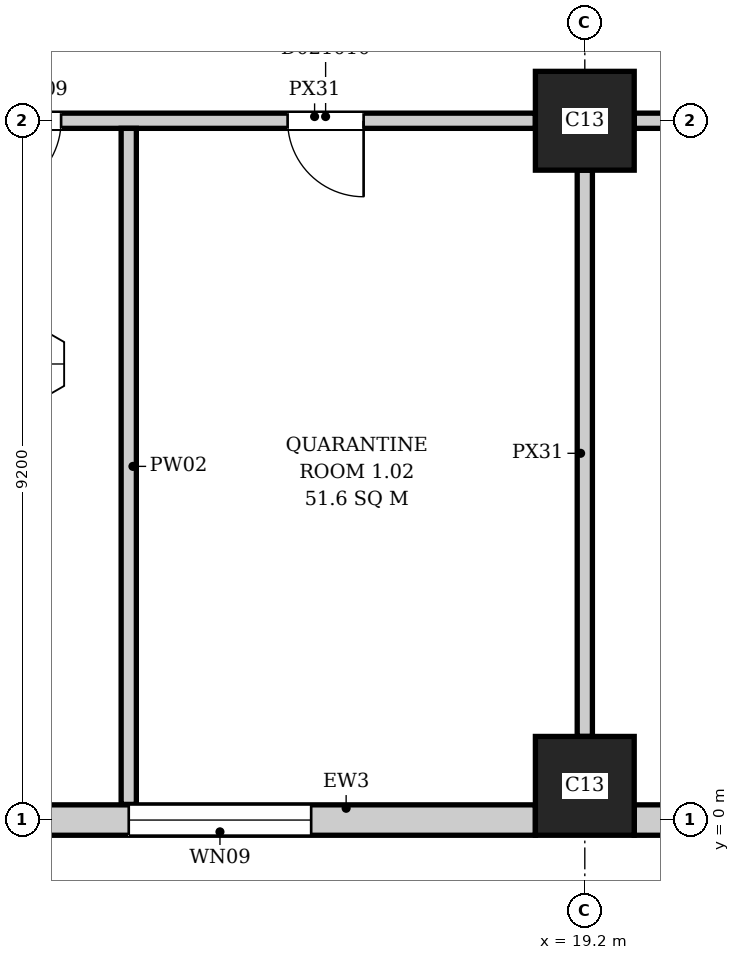
"""IFC4 building model, lengths in metres.
Left out: names, types, materials, properties, quantities, classifications, styles, units other than length and angle.
Written with IfcOpenShell. Run it as: python <this file> out.ifc"""

import sys

from ifc_helpers import new_model, si_unit, direction, frame, frame_2d, origin, origin_2d, place, context, subcontext, project, spatial, rectangle, extrude, element, fill, save


model = new_model("IFC4")
c1 = context("Model", 3, precision=1e-05, world=origin(), true_north=direction((0.0, 1.0)))
c2 = subcontext(c1, "Body", "Model", "MODEL_VIEW")
j1 = project(units=[si_unit("LENGTHUNIT", "METRE"), si_unit("PLANEANGLEUNIT", "RADIAN")], contexts=[c1])
p1 = place(None, origin())
s1 = spatial("IfcSite", under=j1, at=p1, CompositionType="ELEMENT")
p2 = place(p1, origin())
s2 = spatial("IfcBuilding", under=s1, at=p2, CompositionType="ELEMENT")
p3 = place(p2, frame((0.0, 0.0, 6.5)))
s3 = spatial("IfcBuildingStorey", under=s2, at=p3, CompositionType="ELEMENT", Elevation=6.5)
for number, where, z_axis, x_axis in (
    (1, (19.2, 0.45, 0.0), (0.0, 0.0, 1.0), (1.0, 0.0, 0.0)),
    (2, (19.2, 9.2, 0.0), (0.0, 0.0, 1.0), (1.0, 0.0, 0.0)),
):
    element("IfcColumn", number, at=place(p3, frame(where, z_axis=z_axis, x_axis=x_axis)), inside=s3, PredefinedType="COLUMN", context=c2, shape_type="SweptSolid", body=[
        extrude(rectangle(XDim=1.3, YDim=1.3, at=origin_2d()), origin(), (0.0, 0.0, 1.0), 7.7),
    ])
p4 = place(p3, frame((10.25, 0.0, 0.0), z_axis=(0.0, 0.0, 1.0), x_axis=(1.0, 0.0, 0.0)))
e3 = element("IfcWall", 3, at=p4, inside=s3, PredefinedType="ELEMENTEDWALL", context=c2, shape_type="SweptSolid", body=[
    extrude(rectangle(XDim=8.3, YDim=0.4, at=frame_2d((4.15, 0.0))), origin(), (0.0, 0.0, 1.0), 7.35),
])
p5 = place(p4, frame((2.95, 0.0, 1.0)))
e4 = element("IfcOpeningElement", 4, at=p5, cuts=e3, PredefinedType="OPENING", context=c2, shape_type="SweptSolid", body=[
    extrude(rectangle(XDim=2.4, YDim=2.2, at=frame_2d((1.2, 1.1))), frame((0.0, 0.21, 0.0), z_axis=(0.0, -1.0, 0.0), x_axis=(1.0, 0.0, 0.0)), (0.0, 0.0, 1.0), 0.42),
])
p6 = place(p3, frame((19.85, 0.0, 0.0), z_axis=(0.0, 0.0, 1.0), x_axis=(1.0, 0.0, 0.0)))
e5 = element("IfcWall", 5, at=p6, inside=s3, PredefinedType="ELEMENTEDWALL", context=c2, shape_type="SweptSolid", body=[
    extrude(rectangle(XDim=8.3, YDim=0.4, at=frame_2d((4.15, 0.0))), origin(), (0.0, 0.0, 1.0), 7.35),
])
p7 = place(p6, frame((2.95, 0.0, 1.0)))
e6 = element("IfcOpeningElement", 6, at=p7, cuts=e5, PredefinedType="OPENING", context=c2, shape_type="SweptSolid", body=[
    extrude(rectangle(XDim=2.4, YDim=2.2, at=frame_2d((1.2, 1.1))), frame((0.0, 0.21, 0.0), z_axis=(0.0, -1.0, 0.0), x_axis=(1.0, 0.0, 0.0)), (0.0, 0.0, 1.0), 0.42),
])
p8 = place(p3, frame((10.25, 9.2, 0.0), z_axis=(0.0, 0.0, 1.0), x_axis=(1.0, 0.0, 0.0)))
e7 = element("IfcWall", 7, at=p8, inside=s3, PredefinedType="PARTITIONING", context=c2, shape_type="SweptSolid", body=[
    extrude(rectangle(XDim=8.3, YDim=0.2, at=frame_2d((4.15, 0.0))), origin(), (0.0, 0.0, 1.0), 6.95),
])
p9 = place(p8, frame((1.06, 0.0, 0.0)))
e8 = element("IfcOpeningElement", 8, at=p9, cuts=e7, PredefinedType="OPENING", context=c2, shape_type="SweptSolid", body=[
    extrude(rectangle(XDim=1.0, YDim=2.1, at=frame_2d((0.5, 1.05))), frame((0.0, 0.11, 0.0), z_axis=(0.0, -1.0, 0.0), x_axis=(1.0, 0.0, 0.0)), (0.0, 0.0, 1.0), 0.22),
])
p10 = place(p8, frame((5.04, 0.0, 0.0)))
e9 = element("IfcOpeningElement", 9, at=p10, cuts=e7, PredefinedType="OPENING", context=c2, shape_type="SweptSolid", body=[
    extrude(rectangle(XDim=1.0, YDim=2.1, at=frame_2d((0.5, 1.05))), frame((0.0, 0.11, 0.0), z_axis=(0.0, -1.0, 0.0), x_axis=(1.0, 0.0, 0.0)), (0.0, 0.0, 1.0), 0.22),
])
p11 = place(p3, frame((13.2, 0.206, 0.0), z_axis=(0.0, 0.0, 1.0), x_axis=(0.0, 1.0, 0.0)))
e10 = element("IfcWall", 10, at=p11, inside=s3, PredefinedType="PARTITIONING", context=c2, shape_type="SweptSolid", body=[
    extrude(rectangle(XDim=8.894, YDim=0.2, at=frame_2d((4.447, 0.0))), origin(), (0.0, 0.0, 1.0), 7.35),
])
p12 = place(p3, frame((19.2, 1.1, 0.0), z_axis=(0.0, 0.0, 1.0), x_axis=(0.0, 1.0, 0.0)))
e11 = element("IfcWall", 11, at=p12, inside=s3, PredefinedType="PARTITIONING", context=c2, shape_type="SweptSolid", body=[
    extrude(rectangle(XDim=7.45, YDim=0.2, at=frame_2d((3.725, 0.0))), origin(), (0.0, 0.0, 1.0), 6.95),
])
p13 = place(p3, frame((19.85, 9.2, 0.0), z_axis=(0.0, 0.0, 1.0), x_axis=(1.0, 0.0, 0.0)))
e12 = element("IfcWall", 12, at=p13, inside=s3, PredefinedType="PARTITIONING", context=c2, shape_type="SweptSolid", body=[
    extrude(rectangle(XDim=8.3, YDim=0.2, at=frame_2d((4.15, 0.0))), origin(), (0.0, 0.0, 1.0), 6.95),
])
p14 = place(p13, frame((3.65, 0.0, 0.0)))
e13 = element("IfcOpeningElement", 13, at=p14, cuts=e12, PredefinedType="OPENING", context=c2, shape_type="SweptSolid", body=[
    extrude(rectangle(XDim=1.0, YDim=2.1, at=frame_2d((0.5, 1.05))), frame((0.0, 0.11, 0.0), z_axis=(0.0, -1.0, 0.0), x_axis=(1.0, 0.0, 0.0)), (0.0, 0.0, 1.0), 0.22),
])
p15 = place(p5, origin())
e14 = element("IfcWindow", 14, at=p15, inside=s3, PartitioningType="SINGLE_PANEL", PredefinedType="WINDOW", context=c2, shape_type="SweptSolid", body=[
    extrude(rectangle(XDim=2.4, YDim=2.2, at=frame_2d((1.2, 1.1))), frame((0.0, 0.03, 0.0), z_axis=(0.0, -1.0, 0.0), x_axis=(1.0, 0.0, 0.0)), (0.0, 0.0, 1.0), 0.06),
])
fill(e4, e14)
p16 = place(p9, origin())
e15 = element("IfcDoor", 15, at=p16, inside=s3, OperationType="SINGLE_SWING_LEFT", PredefinedType="DOOR", context=c2, shape_type="SweptSolid", body=[
    extrude(rectangle(XDim=1.0, YDim=2.1, at=frame_2d((0.5, 1.05))), frame((0.0, 0.025, 0.0), z_axis=(0.0, -1.0, 0.0), x_axis=(1.0, 0.0, 0.0)), (0.0, 0.0, 1.0), 0.05),
])
fill(e8, e15)
p17 = place(p10, origin())
e16 = element("IfcDoor", 16, at=p17, inside=s3, OperationType="SINGLE_SWING_RIGHT", PredefinedType="DOOR", context=c2, shape_type="SweptSolid", body=[
    extrude(rectangle(XDim=1.0, YDim=2.1, at=frame_2d((0.5, 1.05))), frame((0.0, 0.025, 0.0), z_axis=(0.0, -1.0, 0.0), x_axis=(1.0, 0.0, 0.0)), (0.0, 0.0, 1.0), 0.05),
])
fill(e9, e16)
save(model, sys.argv[1])
